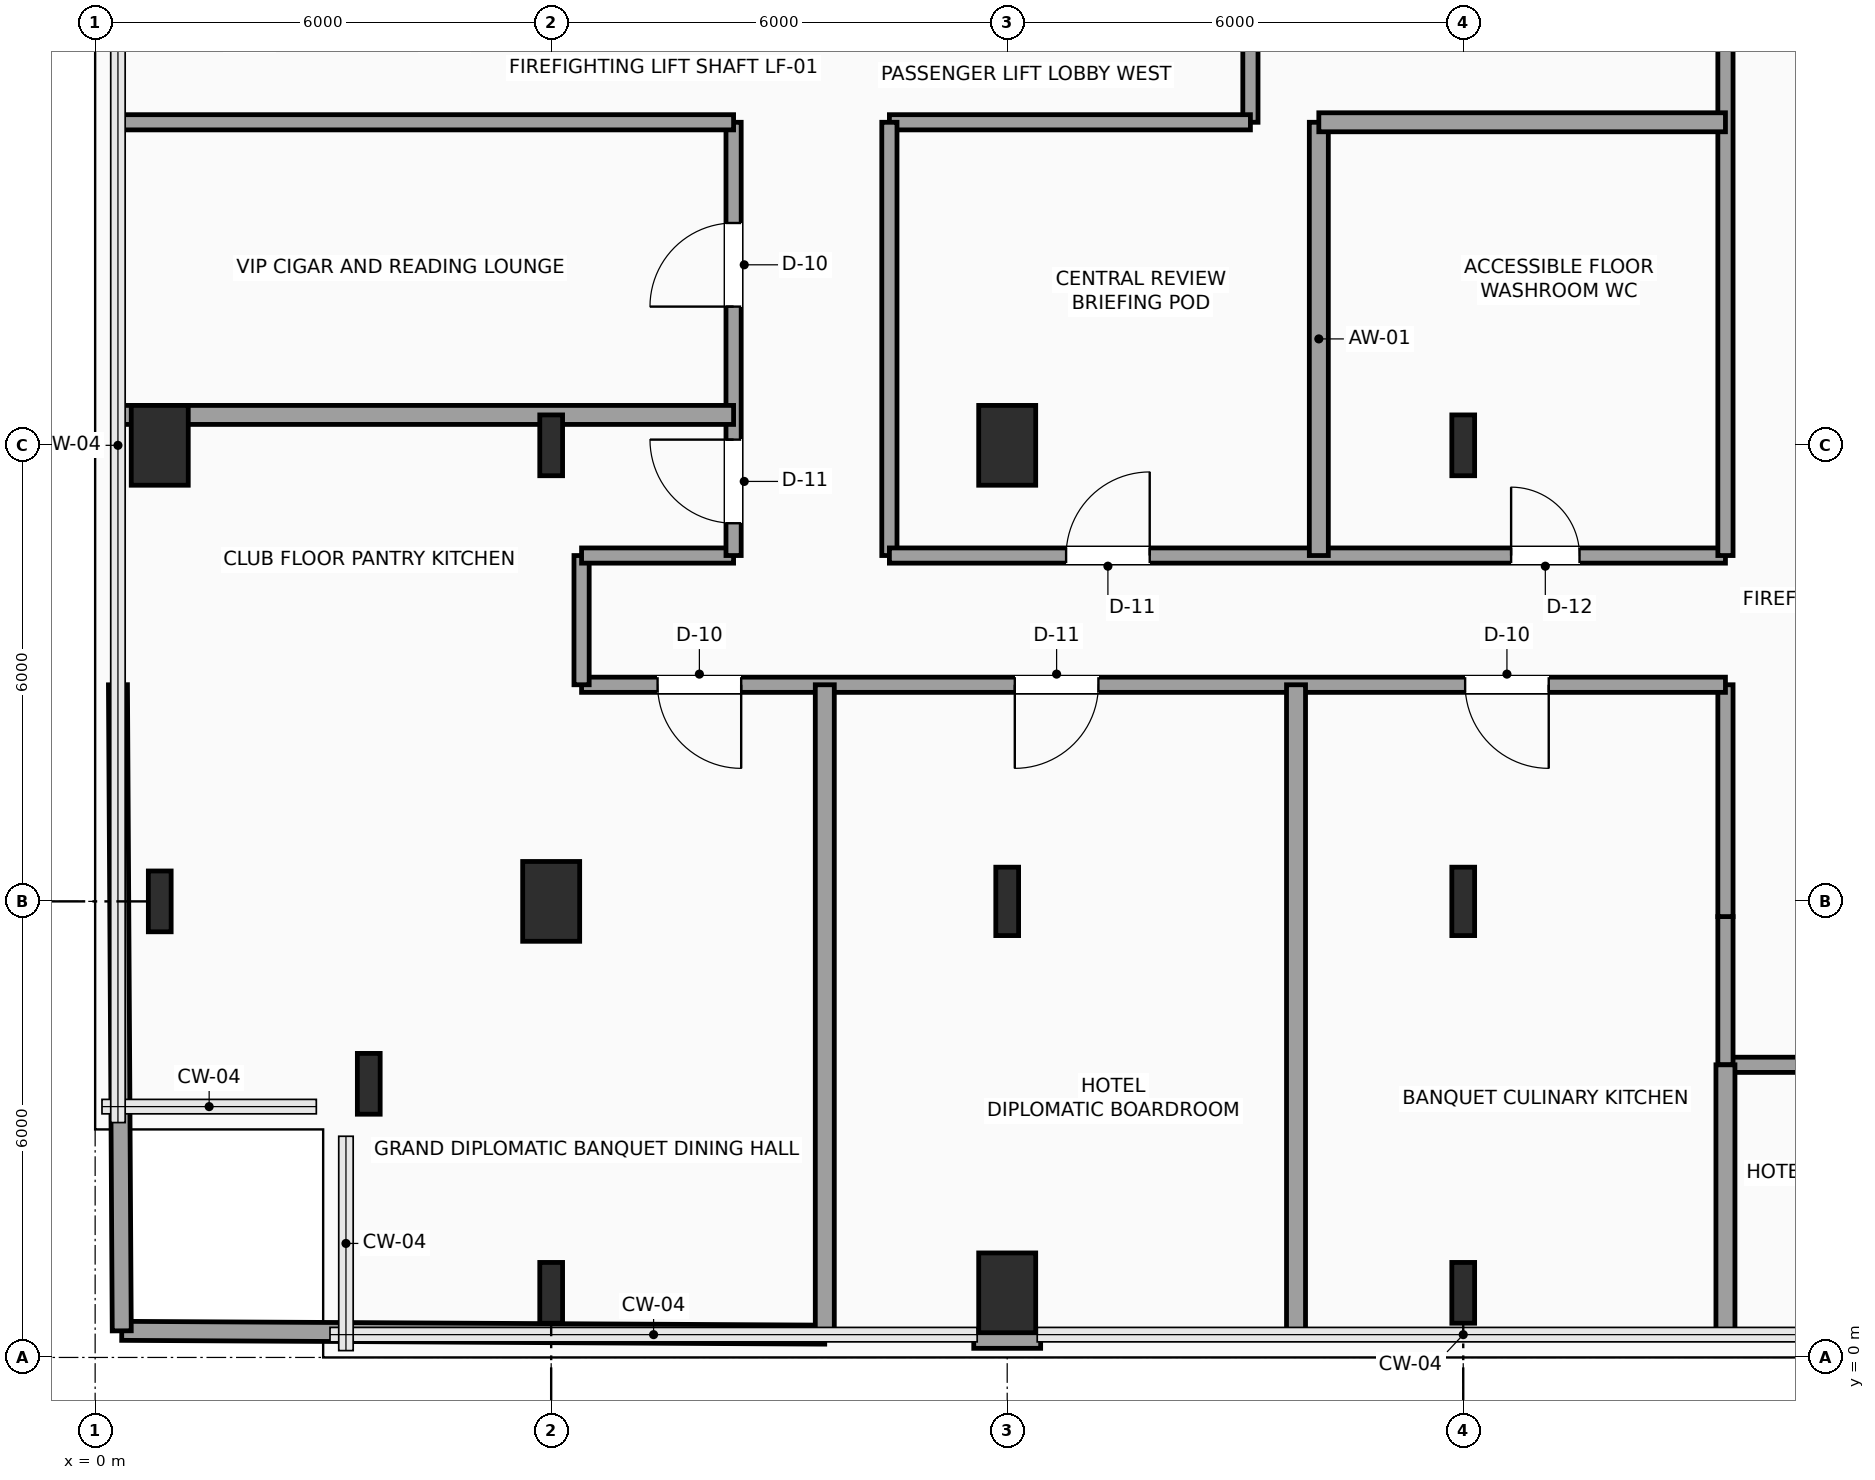
"""IFC4 building model, lengths in metres.
Left out: names, types, materials, properties, quantities, classifications, styles, units other than length and angle.
Written with IfcOpenShell. Run it as: python <this file> out.ifc"""

import sys

from ifc_helpers import new_model, si_unit, direction, frame, frame_2d, origin, origin_2d, place, context, subcontext, project, spatial, rectangle, i_section, extrude, element, fill, save


model = new_model("IFC4")
c1 = context("Model", 3, precision=1e-05, world=origin(), true_north=direction((0.0, 1.0)))
c2 = subcontext(c1, "Body", "Model", "MODEL_VIEW")
j1 = project(units=[si_unit("LENGTHUNIT", "METRE"), si_unit("PLANEANGLEUNIT", "RADIAN")], contexts=[c1])
p1 = place(None, origin())
s1 = spatial("IfcSite", under=j1, at=p1, CompositionType="ELEMENT")
p2 = place(p1, origin())
s2 = spatial("IfcBuilding", under=s1, at=p2, CompositionType="ELEMENT")
p3 = place(p2, frame((0.0, 0.0, 180.45)))
s3 = spatial("IfcBuildingStorey", under=s2, at=p3, CompositionType="ELEMENT", Elevation=180.45)
for number, where, z_axis, x_axis in (
    (1, (3.6, 3.6, 0.0), (0.0, 0.0, 1.0), (1.0, 0.0, 0.0)),
    (2, (0.85, 6.0, 0.0), (0.0, 0.0, 1.0), (1.0, 0.0, 0.0)),
):
    element("IfcColumn", number, at=place(p3, frame(where, z_axis=z_axis, x_axis=x_axis)), inside=s3, PredefinedType="COLUMN", context=c2, shape_type="SweptSolid", body=[
        extrude(i_section(OverallWidth=0.3, OverallDepth=0.8, WebThickness=0.018, FlangeThickness=0.033, FilletRadius=0.03, at=origin_2d()), origin(), (0.0, 0.0, 1.0), 3.75),
    ])
p4 = place(p3, frame((0.85, 12.0, 0.0), z_axis=(0.0, 0.0, 1.0), x_axis=(1.0, 0.0, 0.0)))
e3 = element("IfcColumn", 3, at=p4, inside=s3, PredefinedType="COLUMN", context=c2, shape_type="SweptSolid", body=[
    extrude(rectangle(XDim=0.75, YDim=1.05, at=origin_2d()), origin(), (0.0, 0.0, 1.0), 3.75),
])
p5 = place(p3, frame((6.0, 0.85, 0.0), z_axis=(0.0, 0.0, 1.0), x_axis=(1.0, 0.0, 0.0)))
e4 = element("IfcColumn", 4, at=p5, inside=s3, PredefinedType="COLUMN", context=c2, shape_type="SweptSolid", body=[
    extrude(i_section(OverallWidth=0.3, OverallDepth=0.8, WebThickness=0.018, FlangeThickness=0.033, FilletRadius=0.03, at=origin_2d()), origin(), (0.0, 0.0, 1.0), 3.75),
])
p6 = place(p3, frame((6.0, 6.0, 0.0), z_axis=(0.0, 0.0, 1.0), x_axis=(1.0, 0.0, 0.0)))
e5 = element("IfcColumn", 5, at=p6, inside=s3, PredefinedType="COLUMN", context=c2, shape_type="SweptSolid", body=[
    extrude(rectangle(XDim=0.75, YDim=1.05, at=origin_2d()), origin(), (0.0, 0.0, 1.0), 3.75),
])
p7 = place(p3, frame((6.0, 12.0, 0.0), z_axis=(0.0, 0.0, 1.0), x_axis=(1.0, 0.0, 0.0)))
e6 = element("IfcColumn", 6, at=p7, inside=s3, PredefinedType="COLUMN", context=c2, shape_type="SweptSolid", body=[
    extrude(i_section(OverallWidth=0.3, OverallDepth=0.8, WebThickness=0.018, FlangeThickness=0.033, FilletRadius=0.03, at=origin_2d()), origin(), (0.0, 0.0, 1.0), 3.75),
])
p8 = place(p3, frame((12.0, 0.85, 0.0), z_axis=(0.0, 0.0, 1.0), x_axis=(1.0, 0.0, 0.0)))
e7 = element("IfcColumn", 7, at=p8, inside=s3, PredefinedType="COLUMN", context=c2, shape_type="SweptSolid", body=[
    extrude(rectangle(XDim=0.75, YDim=1.05, at=origin_2d()), origin(), (0.0, 0.0, 1.0), 3.75),
])
p9 = place(p3, frame((12.0, 6.0, 0.0), z_axis=(0.0, 0.0, 1.0), x_axis=(1.0, 0.0, 0.0)))
e8 = element("IfcColumn", 8, at=p9, inside=s3, PredefinedType="COLUMN", context=c2, shape_type="SweptSolid", body=[
    extrude(i_section(OverallWidth=0.3, OverallDepth=0.9, WebThickness=0.019, FlangeThickness=0.035, FilletRadius=0.03, at=origin_2d()), origin(), (0.0, 0.0, 1.0), 3.75),
])
p10 = place(p3, frame((12.0, 12.0, 0.0), z_axis=(0.0, 0.0, 1.0), x_axis=(1.0, 0.0, 0.0)))
e9 = element("IfcColumn", 9, at=p10, inside=s3, PredefinedType="COLUMN", context=c2, shape_type="SweptSolid", body=[
    extrude(rectangle(XDim=0.75, YDim=1.05, at=origin_2d()), origin(), (0.0, 0.0, 1.0), 3.75),
])
p11 = place(p3, frame((18.0, 0.85, 0.0), z_axis=(0.0, 0.0, 1.0), x_axis=(1.0, 0.0, 0.0)))
e10 = element("IfcColumn", 10, at=p11, inside=s3, PredefinedType="COLUMN", context=c2, shape_type="SweptSolid", body=[
    extrude(i_section(OverallWidth=0.3, OverallDepth=0.8, WebThickness=0.018, FlangeThickness=0.033, FilletRadius=0.03, at=origin_2d()), origin(), (0.0, 0.0, 1.0), 3.75),
])
p12 = place(p3, frame((18.0, 6.0, 0.0), z_axis=(0.0, 0.0, 1.0), x_axis=(1.0, 0.0, 0.0)))
e11 = element("IfcColumn", 11, at=p12, inside=s3, PredefinedType="COLUMN", context=c2, shape_type="SweptSolid", body=[
    extrude(i_section(OverallWidth=0.3, OverallDepth=0.9, WebThickness=0.019, FlangeThickness=0.035, FilletRadius=0.03, at=origin_2d()), origin(), (0.0, 0.0, 1.0), 3.75),
])
p13 = place(p3, frame((18.0, 12.0, 0.0), z_axis=(0.0, 0.0, 1.0), x_axis=(1.0, 0.0, 0.0)))
e12 = element("IfcColumn", 12, at=p13, inside=s3, PredefinedType="COLUMN", context=c2, shape_type="SweptSolid", body=[
    extrude(i_section(OverallWidth=0.3, OverallDepth=0.8, WebThickness=0.018, FlangeThickness=0.033, FilletRadius=0.03, at=origin_2d()), origin(), (0.0, 0.0, 1.0), 3.75),
])
p14 = place(p3, frame((12.44, 0.24, 0.0), z_axis=(0.0, 0.0, 1.0), x_axis=(-1.0, 0.0, 0.0)))
e13 = element("IfcWall", 13, at=p14, inside=s3, PredefinedType="SOLIDWALL", context=c2, shape_type="SweptSolid", body=[
    extrude(rectangle(XDim=0.88, YDim=0.24, at=frame_2d((0.44, 0.0))), origin(), (0.0, 0.0, 1.0), 3.54),
])
p15 = place(p3, frame((23.95, 3.85, 0.0), z_axis=(0.0, 0.0, 1.0), x_axis=(-1.0, 0.0, 0.0)))
e14 = element("IfcWall", 14, at=p15, inside=s3, PredefinedType="SOLIDWALL", context=c2, shape_type="SweptSolid", body=[
    extrude(rectangle(XDim=2.5, YDim=0.2, at=frame_2d((1.25, 0.0))), origin(), (0.0, 0.0, 1.0), 3.54),
])
p16 = place(p3, frame((21.45, 3.85, 0.0), z_axis=(0.0, 0.0, 1.0), x_axis=(0.0, 1.0, 0.0)))
e15 = element("IfcWall", 15, at=p16, inside=s3, PredefinedType="SOLIDWALL", context=c2, shape_type="SweptSolid", body=[
    extrude(rectangle(XDim=1.95, YDim=0.2, at=frame_2d((0.975, 0.0))), origin(), (0.0, 0.0, 1.0), 3.54),
])
p17 = place(p3, frame((21.45, 5.8, 0.0), z_axis=(0.0, 0.0, 1.0), x_axis=(0.0, 1.0, 0.0)))
e16 = element("IfcWall", 16, at=p17, inside=s3, PredefinedType="SOLIDWALL", context=c2, shape_type="SweptSolid", body=[
    extrude(rectangle(XDim=3.05, YDim=0.2, at=frame_2d((1.525, 0.0))), origin(), (0.0, 0.0, 1.0), 3.54),
])
p18 = place(p3, frame((21.45, 8.85, 0.0), z_axis=(0.0, 0.0, 1.0), x_axis=(-1.0, 0.0, 0.0)))
e17 = element("IfcWall", 17, at=p18, inside=s3, PredefinedType="SOLIDWALL", context=c2, shape_type="SweptSolid", body=[
    extrude(rectangle(XDim=15.05, YDim=0.2, at=frame_2d((7.525, 0.0))), origin(), (0.0, 0.0, 1.0), 3.132),
])
p19 = place(p18, frame((12.95, 0.0, 0.0)))
e18 = element("IfcOpeningElement", 18, at=p19, cuts=e17, PredefinedType="OPENING", context=c2, shape_type="SweptSolid", body=[
    extrude(rectangle(XDim=1.1, YDim=2.25, at=frame_2d((0.55, 1.125))), frame((0.0, 0.11, 0.0), z_axis=(0.0, -1.0, 0.0), x_axis=(1.0, 0.0, 0.0)), (0.0, 0.0, 1.0), 0.22),
])
p20 = place(p18, frame((8.25, 0.0, 0.0)))
e19 = element("IfcOpeningElement", 19, at=p20, cuts=e17, PredefinedType="OPENING", context=c2, shape_type="SweptSolid", body=[
    extrude(rectangle(XDim=1.1, YDim=2.25, at=frame_2d((0.55, 1.125))), frame((0.0, 0.11, 0.0), z_axis=(0.0, -1.0, 0.0), x_axis=(1.0, 0.0, 0.0)), (0.0, 0.0, 1.0), 0.22),
])
p21 = place(p18, frame((2.325, 0.0, 0.0)))
e20 = element("IfcOpeningElement", 20, at=p21, cuts=e17, PredefinedType="OPENING", context=c2, shape_type="SweptSolid", body=[
    extrude(rectangle(XDim=1.1, YDim=2.25, at=frame_2d((0.55, 1.125))), frame((0.0, 0.11, 0.0), z_axis=(0.0, -1.0, 0.0), x_axis=(1.0, 0.0, 0.0)), (0.0, 0.0, 1.0), 0.22),
])
p22 = place(p3, frame((6.4, 8.85, 0.0), z_axis=(0.0, 0.0, 1.0), x_axis=(0.0, 1.0, 0.0)))
e21 = element("IfcWall", 21, at=p22, inside=s3, PredefinedType="SOLIDWALL", context=c2, shape_type="SweptSolid", body=[
    extrude(rectangle(XDim=1.7, YDim=0.2, at=frame_2d((0.85, 0.0))), origin(), (0.0, 0.0, 1.0), 3.54),
])
p23 = place(p3, frame((6.4, 10.55, 0.0), z_axis=(0.0, 0.0, 1.0), x_axis=(1.0, 0.0, 0.0)))
e22 = element("IfcWall", 22, at=p23, inside=s3, PredefinedType="SOLIDWALL", context=c2, shape_type="SweptSolid", body=[
    extrude(rectangle(XDim=2.0, YDim=0.2, at=frame_2d((1.0, 0.0))), origin(), (0.0, 0.0, 1.0), 3.54),
])
p24 = place(p3, frame((8.4, 10.55, 0.0), z_axis=(0.0, 0.0, 1.0), x_axis=(0.0, 1.0, 0.0)))
e23 = element("IfcWall", 23, at=p24, inside=s3, PredefinedType="SOLIDWALL", context=c2, shape_type="SweptSolid", body=[
    extrude(rectangle(XDim=5.7, YDim=0.2, at=frame_2d((2.85, 0.0))), origin(), (0.0, 0.0, 1.0), 3.54),
])
p25 = place(p24, frame((0.425, 0.0, 0.0)))
e24 = element("IfcOpeningElement", 24, at=p25, cuts=e23, PredefinedType="OPENING", context=c2, shape_type="SweptSolid", body=[
    extrude(rectangle(XDim=1.1, YDim=2.25, at=frame_2d((0.55, 1.125))), frame((0.0, 0.11, 0.0), z_axis=(0.0, -1.0, 0.0), x_axis=(1.0, 0.0, 0.0)), (0.0, 0.0, 1.0), 0.22),
])
p26 = place(p24, frame((3.275, 0.0, 0.0)))
e25 = element("IfcOpeningElement", 25, at=p26, cuts=e23, PredefinedType="OPENING", context=c2, shape_type="SweptSolid", body=[
    extrude(rectangle(XDim=1.1, YDim=2.25, at=frame_2d((0.55, 1.125))), frame((0.0, 0.11, 0.0), z_axis=(0.0, -1.0, 0.0), x_axis=(1.0, 0.0, 0.0)), (0.0, 0.0, 1.0), 0.22),
])
p27 = place(p3, frame((8.4, 16.25, 0.0), z_axis=(0.0, 0.0, 1.0), x_axis=(-1.0, 0.0, 0.0)))
e26 = element("IfcWall", 26, at=p27, inside=s3, PredefinedType="SOLIDWALL", context=c2, shape_type="SweptSolid", body=[
    extrude(rectangle(XDim=8.1, YDim=0.2, at=frame_2d((4.05, 0.0))), origin(), (0.0, 0.0, 1.0), 3.54),
])
p28 = place(p3, frame((15.2, 17.95, 0.0), z_axis=(0.0, 0.0, 1.0), x_axis=(0.0, -1.0, 0.0)))
e27 = element("IfcWall", 27, at=p28, inside=s3, PredefinedType="SOLIDWALL", context=c2, shape_type="SweptSolid", body=[
    extrude(rectangle(XDim=1.7, YDim=0.2, at=frame_2d((0.85, 0.0))), origin(), (0.0, 0.0, 1.0), 3.54),
])
p29 = place(p3, frame((15.2, 16.25, 0.0), z_axis=(0.0, 0.0, 1.0), x_axis=(-1.0, 0.0, 0.0)))
e28 = element("IfcWall", 28, at=p29, inside=s3, PredefinedType="SOLIDWALL", context=c2, shape_type="SweptSolid", body=[
    extrude(rectangle(XDim=4.75, YDim=0.2, at=frame_2d((2.375, 0.0))), origin(), (0.0, 0.0, 1.0), 3.54),
])
p30 = place(p3, frame((10.45, 16.25, 0.0), z_axis=(0.0, 0.0, 1.0), x_axis=(0.0, -1.0, 0.0)))
e29 = element("IfcWall", 29, at=p30, inside=s3, PredefinedType="SOLIDWALL", context=c2, shape_type="SweptSolid", body=[
    extrude(rectangle(XDim=5.7, YDim=0.2, at=frame_2d((2.85, 0.0))), origin(), (0.0, 0.0, 1.0), 3.54),
])
p31 = place(p3, frame((10.45, 10.55, 0.0), z_axis=(0.0, 0.0, 1.0), x_axis=(1.0, 0.0, 0.0)))
e30 = element("IfcWall", 30, at=p31, inside=s3, PredefinedType="SOLIDWALL", context=c2, shape_type="SweptSolid", body=[
    extrude(rectangle(XDim=11.0, YDim=0.2, at=frame_2d((5.5, 0.0))), origin(), (0.0, 0.0, 1.0), 3.54),
])
p32 = place(p31, frame((2.325, 0.0, 0.0)))
e31 = element("IfcOpeningElement", 31, at=p32, cuts=e30, PredefinedType="OPENING", context=c2, shape_type="SweptSolid", body=[
    extrude(rectangle(XDim=1.1, YDim=2.25, at=frame_2d((0.55, 1.125))), frame((0.0, 0.11, 0.0), z_axis=(0.0, -1.0, 0.0), x_axis=(1.0, 0.0, 0.0)), (0.0, 0.0, 1.0), 0.22),
])
p33 = place(p31, frame((8.18, 0.0, 0.0)))
e32 = element("IfcOpeningElement", 32, at=p33, cuts=e30, PredefinedType="OPENING", context=c2, shape_type="SweptSolid", body=[
    extrude(rectangle(XDim=0.9, YDim=2.1, at=frame_2d((0.45, 1.05))), frame((0.0, 0.11, 0.0), z_axis=(0.0, -1.0, 0.0), x_axis=(1.0, 0.0, 0.0)), (0.0, 0.0, 1.0), 0.22),
])
p34 = place(p3, frame((21.45, 10.55, 0.0), z_axis=(0.0, 0.0, 1.0), x_axis=(0.0, 1.0, 0.0)))
e33 = element("IfcWall", 33, at=p34, inside=s3, PredefinedType="SOLIDWALL", context=c2, shape_type="SweptSolid", body=[
    extrude(rectangle(XDim=19.7, YDim=0.2, at=frame_2d((9.85, 0.0))), origin(), (0.0, 0.0, 1.0), 3.54),
])
p35 = place(p34, frame((9.4, 0.0, 0.0)))
e34 = element("IfcOpeningElement", 34, at=p35, cuts=e33, PredefinedType="OPENING", context=c2, shape_type="SweptSolid", body=[
    extrude(rectangle(XDim=0.95, YDim=2.15, at=frame_2d((0.475, 1.075))), frame((0.0, 0.11, 0.0), z_axis=(0.0, -1.0, 0.0), x_axis=(1.0, 0.0, 0.0)), (0.0, 0.0, 1.0), 0.22),
])
p36 = place(p34, frame((14.175, 0.0, 0.0)))
e35 = element("IfcOpeningElement", 35, at=p36, cuts=e33, PredefinedType="OPENING", context=c2, shape_type="SweptSolid", body=[
    extrude(rectangle(XDim=0.9, YDim=2.1, at=frame_2d((0.45, 1.05))), frame((0.0, 0.11, 0.0), z_axis=(0.0, -1.0, 0.0), x_axis=(1.0, 0.0, 0.0)), (0.0, 0.0, 1.0), 0.22),
])
p37 = place(p3, frame((16.1, 10.55, 0.0), z_axis=(0.0, 0.0, 1.0), x_axis=(0.0, 1.0, 0.0)))
e36 = element("IfcWall", 36, at=p37, inside=s3, PredefinedType="PARTITIONING", context=c2, shape_type="SweptSolid", body=[
    extrude(rectangle(XDim=5.7, YDim=0.25, at=frame_2d((2.85, 0.0))), origin(), (0.0, 0.0, 1.0), 3.54),
])
p38 = place(p3, frame((16.1, 16.25, 0.0), z_axis=(0.0, 0.0, 1.0), x_axis=(1.0, 0.0, 0.0)))
e37 = element("IfcWall", 37, at=p38, inside=s3, PredefinedType="PARTITIONING", context=c2, shape_type="SweptSolid", body=[
    extrude(rectangle(XDim=5.35, YDim=0.25, at=frame_2d((2.675, 0.0))), origin(), (0.0, 0.0, 1.0), 3.54),
])
p39 = place(p3, frame((21.45, 0.3, 0.0), z_axis=(0.0, 0.0, 1.0), x_axis=(0.0, 1.0, 0.0)))
e38 = element("IfcWall", 38, at=p39, inside=s3, PredefinedType="PARTITIONING", context=c2, shape_type="SweptSolid", body=[
    extrude(rectangle(XDim=3.55, YDim=0.25, at=frame_2d((1.775, 0.0))), origin(), (0.0, 0.0, 1.0), 3.54),
])
p40 = place(p3, frame((0.35, 0.35, 0.0), z_axis=(0.0, 0.0, 1.0), x_axis=(0.99998536257, -0.005410604923, 0.0)))
e39 = element("IfcWall", 39, at=p40, inside=s3, PredefinedType="PARTITIONING", context=c2, shape_type="SweptSolid", body=[
    extrude(rectangle(XDim=9.25, YDim=0.25, at=frame_2d((4.625, 0.0))), origin(), (0.0, 0.0, 1.0), 3.54),
])
p41 = place(p3, frame((0.35, 0.35, 0.0), z_axis=(0.0, 0.0, 1.0), x_axis=(-0.00588799536, 0.999982665605, 0.0)))
e40 = element("IfcWall", 40, at=p41, inside=s3, PredefinedType="PARTITIONING", context=c2, shape_type="SweptSolid", body=[
    extrude(rectangle(XDim=8.5, YDim=0.25, at=frame_2d((4.25, 0.0))), origin(), (0.0, 0.0, 1.0), 3.54),
])
for number, where, z_axis, x_axis in (
    (41, (9.6, 0.3, 0.0), (0.0, 0.0, 1.0), (0.0, 1.0, 0.0)),
    (42, (15.8, 0.3, 0.0), (0.0, 0.0, 1.0), (0.0, 1.0, 0.0)),
):
    element("IfcWall", number, at=place(p3, frame(where, z_axis=z_axis, x_axis=x_axis)), inside=s3, PredefinedType="PARTITIONING", context=c2, shape_type="SweptSolid", body=[
        extrude(rectangle(XDim=8.55, YDim=0.25, at=frame_2d((4.275, 0.0))), origin(), (0.0, 0.0, 1.0), 3.54),
    ])
p42 = place(p3, frame((0.3, 12.4, 0.0), z_axis=(0.0, 0.0, 1.0), x_axis=(1.0, 0.0, 0.0)))
e43 = element("IfcWall", 43, at=p42, inside=s3, PredefinedType="PARTITIONING", context=c2, shape_type="SweptSolid", body=[
    extrude(rectangle(XDim=8.1, YDim=0.25, at=frame_2d((4.05, 0.0))), origin(), (0.0, 0.0, 1.0), 3.54),
])
p43 = place(p19, origin())
e44 = element("IfcDoor", 44, at=p43, inside=s3, OperationType="SINGLE_SWING_LEFT", PredefinedType="DOOR", context=c2, shape_type="SweptSolid", body=[
    extrude(rectangle(XDim=1.1, YDim=2.25, at=frame_2d((0.55, 1.125))), frame((0.0, 0.025, 0.0), z_axis=(0.0, -1.0, 0.0), x_axis=(1.0, 0.0, 0.0)), (0.0, 0.0, 1.0), 0.05),
])
fill(e18, e44)
p44 = place(p20, origin())
e45 = element("IfcDoor", 45, at=p44, inside=s3, OperationType="SINGLE_SWING_RIGHT", PredefinedType="DOOR", context=c2, shape_type="SweptSolid", body=[
    extrude(rectangle(XDim=1.1, YDim=2.25, at=frame_2d((0.55, 1.125))), frame((0.0, 0.025, 0.0), z_axis=(0.0, -1.0, 0.0), x_axis=(1.0, 0.0, 0.0)), (0.0, 0.0, 1.0), 0.05),
])
fill(e19, e45)
p45 = place(p21, origin())
e46 = element("IfcDoor", 46, at=p45, inside=s3, OperationType="SINGLE_SWING_LEFT", PredefinedType="DOOR", context=c2, shape_type="SweptSolid", body=[
    extrude(rectangle(XDim=1.1, YDim=2.25, at=frame_2d((0.55, 1.125))), frame((0.0, 0.025, 0.0), z_axis=(0.0, -1.0, 0.0), x_axis=(1.0, 0.0, 0.0)), (0.0, 0.0, 1.0), 0.05),
])
fill(e20, e46)
p46 = place(p25, origin())
e47 = element("IfcDoor", 47, at=p46, inside=s3, OperationType="SINGLE_SWING_RIGHT", PredefinedType="DOOR", context=c2, shape_type="SweptSolid", body=[
    extrude(rectangle(XDim=1.1, YDim=2.25, at=frame_2d((0.55, 1.125))), frame((0.0, 0.025, 0.0), z_axis=(0.0, -1.0, 0.0), x_axis=(1.0, 0.0, 0.0)), (0.0, 0.0, 1.0), 0.05),
])
fill(e24, e47)
p47 = place(p26, origin())
e48 = element("IfcDoor", 48, at=p47, inside=s3, OperationType="SINGLE_SWING_LEFT", PredefinedType="DOOR", context=c2, shape_type="SweptSolid", body=[
    extrude(rectangle(XDim=1.1, YDim=2.25, at=frame_2d((0.55, 1.125))), frame((0.0, 0.025, 0.0), z_axis=(0.0, -1.0, 0.0), x_axis=(1.0, 0.0, 0.0)), (0.0, 0.0, 1.0), 0.05),
])
fill(e25, e48)
p48 = place(p32, origin())
e49 = element("IfcDoor", 49, at=p48, inside=s3, OperationType="SINGLE_SWING_RIGHT", PredefinedType="DOOR", context=c2, shape_type="SweptSolid", body=[
    extrude(rectangle(XDim=1.1, YDim=2.25, at=frame_2d((0.55, 1.125))), frame((0.0, 0.025, 0.0), z_axis=(0.0, -1.0, 0.0), x_axis=(1.0, 0.0, 0.0)), (0.0, 0.0, 1.0), 0.05),
])
fill(e31, e49)
p49 = place(p33, origin())
e50 = element("IfcDoor", 50, at=p49, inside=s3, OperationType="SINGLE_SWING_LEFT", PredefinedType="DOOR", context=c2, shape_type="SweptSolid", body=[
    extrude(rectangle(XDim=0.9, YDim=2.1, at=frame_2d((0.45, 1.05))), frame((0.0, 0.025, 0.0), z_axis=(0.0, -1.0, 0.0), x_axis=(1.0, 0.0, 0.0)), (0.0, 0.0, 1.0), 0.05),
])
fill(e32, e50)
save(model, sys.argv[1])
